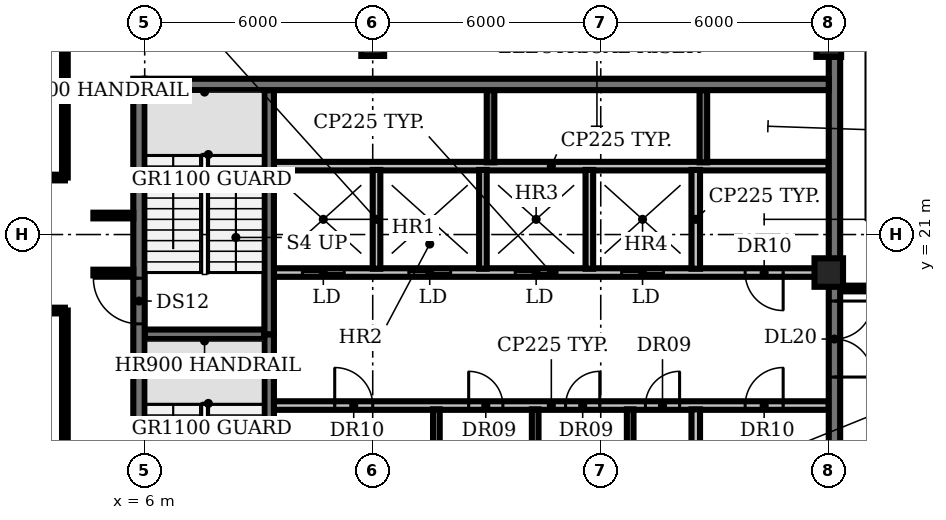
"""IFC4 building model, lengths in metres.
Left out: names, types, materials, properties, quantities, classifications, styles, units other than length and angle.
Written with IfcOpenShell. Run it as: python <this file> out.ifc"""

import sys

from ifc_helpers import new_model, si_unit, direction, frame, frame_2d, origin, origin_2d, place, context, subcontext, project, spatial, rectangle, circle, extrude, element, fill, save


model = new_model("IFC4")
c1 = context("Model", 3, precision=1e-05, world=origin(), true_north=direction((0.0, 1.0)))
c2 = subcontext(c1, "Body", "Model", "MODEL_VIEW")
j1 = project(units=[si_unit("LENGTHUNIT", "METRE"), si_unit("PLANEANGLEUNIT", "RADIAN")], contexts=[c1])
p1 = place(None, origin())
s1 = spatial("IfcSite", under=j1, at=p1, CompositionType="ELEMENT")
p2 = place(p1, origin())
s2 = spatial("IfcBuilding", under=s1, at=p2, CompositionType="ELEMENT")
p3 = place(p2, frame((0.0, 0.0, 314.6)))
s3 = spatial("IfcBuildingStorey", under=s2, at=p3, CompositionType="ELEMENT", Elevation=314.6)
p4 = place(p3, frame((12.0, 26.0, 0.0), z_axis=(0.0, 0.0, 1.0), x_axis=(1.0, 0.0, 0.0)))
e1 = element("IfcColumn", 1, at=p4, inside=s3, PredefinedType="COLUMN", context=c2, shape_type="SweptSolid", body=[
    extrude(rectangle(XDim=0.6, YDim=0.6, at=origin_2d()), origin(), (0.0, 0.0, 1.0), 3.9),
])
p5 = place(p3, frame((24.0, 20.0, 0.0), z_axis=(0.0, 0.0, 1.0), x_axis=(1.0, 0.0, 0.0)))
e2 = element("IfcColumn", 2, at=p5, inside=s3, PredefinedType="COLUMN", context=c2, shape_type="SweptSolid", body=[
    extrude(circle(Radius=0.375, at=origin_2d()), origin(), (0.0, 0.0, 1.0), 3.9),
])
p6 = place(p3, frame((24.0, 26.0, 0.0), z_axis=(0.0, 0.0, 1.0), x_axis=(1.0, 0.0, 0.0)))
e3 = element("IfcColumn", 3, at=p6, inside=s3, PredefinedType="COLUMN", context=c2, shape_type="SweptSolid", body=[
    extrude(rectangle(XDim=0.65, YDim=0.65, at=origin_2d()), origin(), (0.0, 0.0, 1.0), 3.9),
])
p7 = place(p3, frame((9.4, 16.5, 0.0), z_axis=(0.0, 0.0, 1.0), x_axis=(1.0, 0.0, 0.0)))
e4 = element("IfcWall", 4, at=p7, inside=s3, PredefinedType="PARTITIONING", context=c2, shape_type="SweptSolid", body=[
    extrude(rectangle(XDim=14.6, YDim=0.225, at=frame_2d((7.3, 0.0))), origin(), (0.0, 0.0, 1.0), 3.9),
])
p8 = place(p7, frame((1.6, 0.0, 0.0)))
e5 = element("IfcOpeningElement", 5, at=p8, cuts=e4, PredefinedType="OPENING", context=c2, shape_type="SweptSolid", body=[
    extrude(rectangle(XDim=1.0, YDim=2.1, at=frame_2d((0.5, 1.05))), frame((0.0, 0.123, 0.0), z_axis=(0.0, -1.0, 0.0), x_axis=(1.0, 0.0, 0.0)), (0.0, 0.0, 1.0), 0.245),
])
p9 = place(p7, frame((5.125, 0.0, 0.0)))
e6 = element("IfcOpeningElement", 6, at=p9, cuts=e4, PredefinedType="OPENING", context=c2, shape_type="SweptSolid", body=[
    extrude(rectangle(XDim=0.9, YDim=2.1, at=frame_2d((0.45, 1.05))), frame((0.0, 0.123, 0.0), z_axis=(0.0, -1.0, 0.0), x_axis=(1.0, 0.0, 0.0)), (0.0, 0.0, 1.0), 0.245),
])
p10 = place(p7, frame((7.675, 0.0, 0.0)))
e7 = element("IfcOpeningElement", 7, at=p10, cuts=e4, PredefinedType="OPENING", context=c2, shape_type="SweptSolid", body=[
    extrude(rectangle(XDim=0.9, YDim=2.1, at=frame_2d((0.45, 1.05))), frame((0.0, 0.123, 0.0), z_axis=(0.0, -1.0, 0.0), x_axis=(1.0, 0.0, 0.0)), (0.0, 0.0, 1.0), 0.245),
])
p11 = place(p7, frame((9.775, 0.0, 0.0)))
e8 = element("IfcOpeningElement", 8, at=p11, cuts=e4, PredefinedType="OPENING", context=c2, shape_type="SweptSolid", body=[
    extrude(rectangle(XDim=0.9, YDim=2.1, at=frame_2d((0.45, 1.05))), frame((0.0, 0.123, 0.0), z_axis=(0.0, -1.0, 0.0), x_axis=(1.0, 0.0, 0.0)), (0.0, 0.0, 1.0), 0.245),
])
p12 = place(p7, frame((12.4, 0.0, 0.0)))
e9 = element("IfcOpeningElement", 9, at=p12, cuts=e4, PredefinedType="OPENING", context=c2, shape_type="SweptSolid", body=[
    extrude(rectangle(XDim=1.0, YDim=2.1, at=frame_2d((0.5, 1.05))), frame((0.0, 0.123, 0.0), z_axis=(0.0, -1.0, 0.0), x_axis=(1.0, 0.0, 0.0)), (0.0, 0.0, 1.0), 0.245),
])
p13 = place(p3, frame((6.0, 18.375, 0.0), z_axis=(0.0, 0.0, 1.0), x_axis=(1.0, 0.0, 0.0)))
e10 = element("IfcWall", 10, at=p13, inside=s3, PredefinedType="SHEAR", context=c2, shape_type="SweptSolid", body=[
    extrude(rectangle(XDim=3.15, YDim=0.25, at=frame_2d((1.575, 0.0))), origin(), (0.0, 0.0, 1.0), 3.9),
])
p14 = place(p3, frame((24.0, 20.0, 0.0), z_axis=(0.0, 0.0, 1.0), x_axis=(-1.0, 0.0, 0.0)))
e11 = element("IfcWall", 11, at=p14, inside=s3, PredefinedType="PARTITIONING", context=c2, shape_type="SweptSolid", body=[
    extrude(rectangle(XDim=14.6, YDim=0.225, at=frame_2d((7.3, 0.0))), origin(), (0.0, 0.0, 1.0), 3.9),
])
p15 = place(p14, frame((12.75, 0.0, 0.0)))
e12 = element("IfcOpeningElement", 12, at=p15, cuts=e11, PredefinedType="OPENING", context=c2, shape_type="SweptSolid", body=[
    extrude(rectangle(XDim=1.1, YDim=2.1, at=frame_2d((0.55, 1.05))), frame((0.0, 0.123, 0.0), z_axis=(0.0, -1.0, 0.0), x_axis=(1.0, 0.0, 0.0)), (0.0, 0.0, 1.0), 0.245),
])
p16 = place(p14, frame((9.95, 0.0, 0.0)))
e13 = element("IfcOpeningElement", 13, at=p16, cuts=e11, PredefinedType="OPENING", context=c2, shape_type="SweptSolid", body=[
    extrude(rectangle(XDim=1.1, YDim=2.1, at=frame_2d((0.55, 1.05))), frame((0.0, 0.123, 0.0), z_axis=(0.0, -1.0, 0.0), x_axis=(1.0, 0.0, 0.0)), (0.0, 0.0, 1.0), 0.245),
])
p17 = place(p14, frame((7.15, 0.0, 0.0)))
e14 = element("IfcOpeningElement", 14, at=p17, cuts=e11, PredefinedType="OPENING", context=c2, shape_type="SweptSolid", body=[
    extrude(rectangle(XDim=1.1, YDim=2.1, at=frame_2d((0.55, 1.05))), frame((0.0, 0.123, 0.0), z_axis=(0.0, -1.0, 0.0), x_axis=(1.0, 0.0, 0.0)), (0.0, 0.0, 1.0), 0.245),
])
p18 = place(p14, frame((4.35, 0.0, 0.0)))
e15 = element("IfcOpeningElement", 15, at=p18, cuts=e11, PredefinedType="OPENING", context=c2, shape_type="SweptSolid", body=[
    extrude(rectangle(XDim=1.1, YDim=2.1, at=frame_2d((0.55, 1.05))), frame((0.0, 0.123, 0.0), z_axis=(0.0, -1.0, 0.0), x_axis=(1.0, 0.0, 0.0)), (0.0, 0.0, 1.0), 0.245),
])
p19 = place(p14, frame((1.2, 0.0, 0.0)))
e16 = element("IfcOpeningElement", 16, at=p19, cuts=e11, PredefinedType="OPENING", context=c2, shape_type="SweptSolid", body=[
    extrude(rectangle(XDim=1.0, YDim=2.1, at=frame_2d((0.5, 1.05))), frame((0.0, 0.123, 0.0), z_axis=(0.0, -1.0, 0.0), x_axis=(1.0, 0.0, 0.0)), (0.0, 0.0, 1.0), 0.245),
])
p20 = place(p3, frame((9.4, 22.8, 0.0), z_axis=(0.0, 0.0, 1.0), x_axis=(1.0, 0.0, 0.0)))
e17 = element("IfcWall", 17, at=p20, inside=s3, PredefinedType="PARTITIONING", context=c2, shape_type="SweptSolid", body=[
    extrude(rectangle(XDim=14.6, YDim=0.225, at=frame_2d((7.3, 0.0))), origin(), (0.0, 0.0, 1.0), 3.9),
])
p21 = place(p3, frame((9.275, 18.375, 0.0), z_axis=(0.0, 0.0, 1.0), x_axis=(0.0, -1.0, 0.0)))
e18 = element("IfcWall", 18, at=p21, inside=s3, PredefinedType="SHEAR", context=c2, shape_type="SweptSolid", body=[
    extrude(rectangle(XDim=6.55, YDim=0.25, at=frame_2d((3.275, 0.0))), origin(), (0.0, 0.0, 1.0), 3.9),
])
p22 = place(p21, frame((5.075, 0.0, 0.0)))
e19 = element("IfcOpeningElement", 19, at=p22, cuts=e18, PredefinedType="OPENING", context=c2, shape_type="SweptSolid", body=[
    extrude(rectangle(XDim=1.0, YDim=2.1, at=frame_2d((0.5, 1.05))), frame((0.0, 0.135, 0.0), z_axis=(0.0, -1.0, 0.0), x_axis=(1.0, 0.0, 0.0)), (0.0, 0.0, 1.0), 0.27),
])
p23 = place(p3, frame((9.275, 18.375, 0.0), z_axis=(0.0, 0.0, 1.0), x_axis=(0.0, 1.0, 0.0)))
e20 = element("IfcWall", 20, at=p23, inside=s3, PredefinedType="SHEAR", context=c2, shape_type="SweptSolid", body=[
    extrude(rectangle(XDim=6.425, YDim=0.25, at=frame_2d((3.212, 0.0))), origin(), (0.0, 0.0, 1.0), 3.9),
])
p24 = place(p3, frame((12.1, 20.1, 0.0), z_axis=(0.0, 0.0, 1.0), x_axis=(0.0, 1.0, 0.0)))
e21 = element("IfcWall", 21, at=p24, inside=s3, PredefinedType="SOLIDWALL", context=c2, shape_type="SweptSolid", body=[
    extrude(rectangle(XDim=2.6, YDim=0.2, at=frame_2d((1.3, 0.0))), origin(), (0.0, 0.0, 1.0), 3.9),
])
p25 = place(p3, frame((13.675, 13.8, 0.0), z_axis=(0.0, 0.0, 1.0), x_axis=(0.0, 1.0, 0.0)))
e22 = element("IfcWall", 22, at=p25, inside=s3, PredefinedType="PARTITIONING", context=c2, shape_type="SweptSolid", body=[
    extrude(rectangle(XDim=2.6, YDim=0.175, at=frame_2d((1.3, 0.0))), origin(), (0.0, 0.0, 1.0), 3.9),
])
p26 = place(p3, frame((14.9, 20.1, 0.0), z_axis=(0.0, 0.0, 1.0), x_axis=(0.0, 1.0, 0.0)))
e23 = element("IfcWall", 23, at=p26, inside=s3, PredefinedType="SOLIDWALL", context=c2, shape_type="SweptSolid", body=[
    extrude(rectangle(XDim=2.6, YDim=0.2, at=frame_2d((1.3, 0.0))), origin(), (0.0, 0.0, 1.0), 3.9),
])
p27 = place(p3, frame((15.1, 22.9, 0.0), z_axis=(0.0, 0.0, 1.0), x_axis=(0.0, 1.0, 0.0)))
e24 = element("IfcWall", 24, at=p27, inside=s3, PredefinedType="SHEAR", context=c2, shape_type="SweptSolid", body=[
    extrude(rectangle(XDim=1.9, YDim=0.2, at=frame_2d((0.95, 0.0))), origin(), (0.0, 0.0, 1.0), 3.9),
])
p28 = place(p3, frame((16.275, 13.8, 0.0), z_axis=(0.0, 0.0, 1.0), x_axis=(0.0, 1.0, 0.0)))
e25 = element("IfcWall", 25, at=p28, inside=s3, PredefinedType="PARTITIONING", context=c2, shape_type="SweptSolid", body=[
    extrude(rectangle(XDim=2.6, YDim=0.175, at=frame_2d((1.3, 0.0))), origin(), (0.0, 0.0, 1.0), 3.9),
])
p29 = place(p3, frame((17.7, 20.1, 0.0), z_axis=(0.0, 0.0, 1.0), x_axis=(0.0, 1.0, 0.0)))
e26 = element("IfcWall", 26, at=p29, inside=s3, PredefinedType="SOLIDWALL", context=c2, shape_type="SweptSolid", body=[
    extrude(rectangle(XDim=2.6, YDim=0.2, at=frame_2d((1.3, 0.0))), origin(), (0.0, 0.0, 1.0), 3.9),
])
p30 = place(p3, frame((18.775, 13.8, 0.0), z_axis=(0.0, 0.0, 1.0), x_axis=(0.0, 1.0, 0.0)))
e27 = element("IfcWall", 27, at=p30, inside=s3, PredefinedType="PARTITIONING", context=c2, shape_type="SweptSolid", body=[
    extrude(rectangle(XDim=2.6, YDim=0.175, at=frame_2d((1.3, 0.0))), origin(), (0.0, 0.0, 1.0), 3.9),
])
for number, where, z_axis, x_axis in (
    (28, (20.5, 13.8, 0.0), (0.0, 0.0, 1.0), (0.0, 1.0, 0.0)),
    (29, (20.5, 20.1, 0.0), (0.0, 0.0, 1.0), (0.0, 1.0, 0.0)),
):
    element("IfcWall", number, at=place(p3, frame(where, z_axis=z_axis, x_axis=x_axis)), inside=s3, PredefinedType="PARTITIONING", context=c2, shape_type="SweptSolid", body=[
        extrude(rectangle(XDim=2.6, YDim=0.225, at=frame_2d((1.3, 0.0))), origin(), (0.0, 0.0, 1.0), 3.9),
    ])
p31 = place(p3, frame((20.7, 22.9, 0.0), z_axis=(0.0, 0.0, 1.0), x_axis=(0.0, 1.0, 0.0)))
e30 = element("IfcWall", 30, at=p31, inside=s3, PredefinedType="SHEAR", context=c2, shape_type="SweptSolid", body=[
    extrude(rectangle(XDim=1.9, YDim=0.2, at=frame_2d((0.95, 0.0))), origin(), (0.0, 0.0, 1.0), 3.9),
])
p32 = place(p3, frame((5.85, 5.1, 0.0), z_axis=(0.0, 0.0, 1.0), x_axis=(0.0, 1.0, 0.0)))
e31 = element("IfcWall", 31, at=p32, inside=s3, PredefinedType="SHEAR", context=c2, shape_type="SweptSolid", body=[
    extrude(rectangle(XDim=20.0, YDim=0.3, at=frame_2d((10.0, 0.0))), origin(), (0.0, 0.0, 1.0), 3.9),
])
p33 = place(p32, frame((0.55, 0.0, 0.0)))
e32 = element("IfcOpeningElement", 32, at=p33, cuts=e31, PredefinedType="OPENING", context=c2, shape_type="SweptSolid", body=[
    extrude(rectangle(XDim=1.5, YDim=2.1, at=frame_2d((0.75, 1.05))), frame((0.0, 0.16, 0.0), z_axis=(0.0, -1.0, 0.0), x_axis=(1.0, 0.0, 0.0)), (0.0, 0.0, 1.0), 0.32),
])
p34 = place(p32, frame((7.0, 0.0, 0.0)))
e33 = element("IfcOpeningElement", 33, at=p34, cuts=e31, PredefinedType="OPENING", context=c2, shape_type="SweptSolid", body=[
    extrude(rectangle(XDim=1.2, YDim=2.1, at=frame_2d((0.6, 1.05))), frame((0.0, 0.16, 0.0), z_axis=(0.0, -1.0, 0.0), x_axis=(1.0, 0.0, 0.0)), (0.0, 0.0, 1.0), 0.32),
])
p35 = place(p32, frame((13.55, 0.0, 0.0)))
e34 = element("IfcOpeningElement", 34, at=p35, cuts=e31, PredefinedType="OPENING", context=c2, shape_type="SweptSolid", body=[
    extrude(rectangle(XDim=1.2, YDim=2.1, at=frame_2d((0.6, 1.05))), frame((0.0, 0.16, 0.0), z_axis=(0.0, -1.0, 0.0), x_axis=(1.0, 0.0, 0.0)), (0.0, 0.0, 1.0), 0.32),
])
p36 = place(p3, frame((24.15, 25.705, 0.0), z_axis=(0.0, 0.0, 1.0), x_axis=(0.0, -1.0, 0.0)))
e35 = element("IfcWall", 35, at=p36, inside=s3, PredefinedType="SHEAR", context=c2, shape_type="SweptSolid", body=[
    extrude(rectangle(XDim=20.605, YDim=0.3, at=frame_2d((10.302, 0.0))), origin(), (0.0, 0.0, 1.0), 3.9),
])
p37 = place(p36, frame((18.555, 0.0, 0.0)))
e36 = element("IfcOpeningElement", 36, at=p37, cuts=e35, PredefinedType="OPENING", context=c2, shape_type="SweptSolid", body=[
    extrude(rectangle(XDim=1.5, YDim=2.1, at=frame_2d((0.75, 1.05))), frame((0.0, 0.16, 0.0), z_axis=(0.0, -1.0, 0.0), x_axis=(1.0, 0.0, 0.0)), (0.0, 0.0, 1.0), 0.32),
])
p38 = place(p36, frame((12.455, 0.0, 0.0)))
e37 = element("IfcOpeningElement", 37, at=p38, cuts=e35, PredefinedType="OPENING", context=c2, shape_type="SweptSolid", body=[
    extrude(rectangle(XDim=0.9, YDim=2.1, at=frame_2d((0.45, 1.05))), frame((0.0, 0.16, 0.0), z_axis=(0.0, -1.0, 0.0), x_axis=(1.0, 0.0, 0.0)), (0.0, 0.0, 1.0), 0.32),
])
p39 = place(p36, frame((6.455, 0.0, 0.0)))
e38 = element("IfcOpeningElement", 38, at=p39, cuts=e35, PredefinedType="OPENING", context=c2, shape_type="SweptSolid", body=[
    extrude(rectangle(XDim=2.0, YDim=2.1, at=frame_2d((1.0, 1.05))), frame((0.0, 0.16, 0.0), z_axis=(0.0, -1.0, 0.0), x_axis=(1.0, 0.0, 0.0)), (0.0, 0.0, 1.0), 0.32),
])
p40 = place(p3, frame((6.0, 24.95, 0.0), z_axis=(0.0, 0.0, 1.0), x_axis=(1.0, 0.0, 0.0)))
e39 = element("IfcWall", 39, at=p40, inside=s3, PredefinedType="SHEAR", context=c2, shape_type="SweptSolid", body=[
    extrude(rectangle(XDim=18.0, YDim=0.3, at=frame_2d((9.0, 0.0))), origin(), (0.0, 0.0, 1.0), 3.9),
])
for number, where, z_axis, x_axis in (
    (40, (2.79, 19.0, 0.0), (0.0, 0.0, 1.0), (1.0, 0.0, 0.0)),
    (41, (2.79, 22.5, 0.0), (0.0, 0.0, 1.0), (1.0, 0.0, 0.0)),
):
    element("IfcWall", number, at=place(p3, frame(where, z_axis=z_axis, x_axis=x_axis)), inside=s3, PredefinedType="PARTITIONING", context=c2, shape_type="SweptSolid", body=[
        extrude(rectangle(XDim=1.11, YDim=0.15, at=frame_2d((0.555, 0.0))), origin(), (0.0, 0.0, 1.0), 2.95),
    ])
p41 = place(p3, frame((3.9, 5.1, 0.0), z_axis=(0.0, 0.0, 1.0), x_axis=(0.0, 1.0, 0.0)))
e42 = element("IfcWall", 42, at=p41, inside=s3, PredefinedType="PARTITIONING", context=c2, shape_type="SweptSolid", body=[
    extrude(rectangle(XDim=13.9, YDim=0.15, at=frame_2d((6.95, 0.0))), origin(), (0.0, 0.0, 1.0), 2.95),
])
p42 = place(p41, frame((6.2, 0.0, 0.0)))
e43 = element("IfcOpeningElement", 43, at=p42, cuts=e42, PredefinedType="OPENING", context=c2, shape_type="SweptSolid", body=[
    extrude(rectangle(XDim=1.2, YDim=2.1, at=frame_2d((0.6, 1.05))), frame((0.0, 0.085, 0.0), z_axis=(0.0, -1.0, 0.0), x_axis=(1.0, 0.0, 0.0)), (0.0, 0.0, 1.0), 0.17),
])
p43 = place(p3, frame((3.9, 22.5, 0.0), z_axis=(0.0, 0.0, 1.0), x_axis=(0.0, 1.0, 0.0)))
e44 = element("IfcWall", 44, at=p43, inside=s3, PredefinedType="PARTITIONING", context=c2, shape_type="SweptSolid", body=[
    extrude(rectangle(XDim=5.6, YDim=0.15, at=frame_2d((2.8, 0.0))), origin(), (0.0, 0.0, 1.0), 2.95),
])
for number, where, z_axis, x_axis in (
    (45, (4.65, 20.0, 0.0), (0.0, 0.0, 1.0), (1.0, 0.0, 0.0)),
    (46, (4.65, 21.5, 0.0), (0.0, 0.0, 1.0), (1.0, 0.0, 0.0)),
):
    element("IfcWall", number, at=place(p3, frame(where, z_axis=z_axis, x_axis=x_axis)), inside=s3, PredefinedType="PARTITIONING", context=c2, shape_type="SweptSolid", body=[
        extrude(rectangle(XDim=1.05, YDim=0.15, at=frame_2d((0.525, 0.0))), origin(), (0.0, 0.0, 1.0), 2.95),
    ])
p44 = place(p3, frame((24.4, 19.58, 0.0), z_axis=(0.0, 0.0, 1.0), x_axis=(1.0, 0.0, 0.0)))
e47 = element("IfcWall", 47, at=p44, inside=s3, PredefinedType="PARTITIONING", context=c2, shape_type="SweptSolid", body=[
    extrude(rectangle(XDim=1.7, YDim=0.15, at=frame_2d((0.85, 0.0))), origin(), (0.0, 0.0, 1.0), 2.95),
])
p45 = place(p8, origin())
e48 = element("IfcDoor", 48, at=p45, inside=s3, OperationType="SINGLE_SWING_LEFT", PredefinedType="DOOR", context=c2, shape_type="SweptSolid", body=[
    extrude(rectangle(XDim=1.0, YDim=2.1, at=frame_2d((0.5, 1.05))), frame((0.0, 0.025, 0.0), z_axis=(0.0, -1.0, 0.0), x_axis=(1.0, 0.0, 0.0)), (0.0, 0.0, 1.0), 0.05),
])
fill(e5, e48)
p46 = place(p9, origin())
e49 = element("IfcDoor", 49, at=p46, inside=s3, OperationType="SINGLE_SWING_LEFT", PredefinedType="DOOR", context=c2, shape_type="SweptSolid", body=[
    extrude(rectangle(XDim=0.9, YDim=2.1, at=frame_2d((0.45, 1.05))), frame((0.0, 0.025, 0.0), z_axis=(0.0, -1.0, 0.0), x_axis=(1.0, 0.0, 0.0)), (0.0, 0.0, 1.0), 0.05),
])
fill(e6, e49)
p47 = place(p10, origin())
e50 = element("IfcDoor", 50, at=p47, inside=s3, OperationType="SINGLE_SWING_RIGHT", PredefinedType="DOOR", context=c2, shape_type="SweptSolid", body=[
    extrude(rectangle(XDim=0.9, YDim=2.1, at=frame_2d((0.45, 1.05))), frame((0.0, 0.025, 0.0), z_axis=(0.0, -1.0, 0.0), x_axis=(1.0, 0.0, 0.0)), (0.0, 0.0, 1.0), 0.05),
])
fill(e7, e50)
p48 = place(p11, origin())
e51 = element("IfcDoor", 51, at=p48, inside=s3, OperationType="SINGLE_SWING_RIGHT", PredefinedType="DOOR", context=c2, shape_type="SweptSolid", body=[
    extrude(rectangle(XDim=0.9, YDim=2.1, at=frame_2d((0.45, 1.05))), frame((0.0, 0.025, 0.0), z_axis=(0.0, -1.0, 0.0), x_axis=(1.0, 0.0, 0.0)), (0.0, 0.0, 1.0), 0.05),
])
fill(e8, e51)
p49 = place(p12, origin())
e52 = element("IfcDoor", 52, at=p49, inside=s3, OperationType="SINGLE_SWING_RIGHT", PredefinedType="DOOR", context=c2, shape_type="SweptSolid", body=[
    extrude(rectangle(XDim=1.0, YDim=2.1, at=frame_2d((0.5, 1.05))), frame((0.0, 0.025, 0.0), z_axis=(0.0, -1.0, 0.0), x_axis=(1.0, 0.0, 0.0)), (0.0, 0.0, 1.0), 0.05),
])
fill(e9, e52)
p50 = place(p15, origin())
e53 = element("IfcDoor", 53, at=p50, inside=s3, OperationType="DOUBLE_DOOR_SLIDING", PredefinedType="DOOR", context=c2, shape_type="SweptSolid", body=[
    extrude(rectangle(XDim=1.1, YDim=2.1, at=frame_2d((0.55, 1.05))), frame((0.0, 0.025, 0.0), z_axis=(0.0, -1.0, 0.0), x_axis=(1.0, 0.0, 0.0)), (0.0, 0.0, 1.0), 0.05),
])
fill(e12, e53)
p51 = place(p16, origin())
e54 = element("IfcDoor", 54, at=p51, inside=s3, OperationType="DOUBLE_DOOR_SLIDING", PredefinedType="DOOR", context=c2, shape_type="SweptSolid", body=[
    extrude(rectangle(XDim=1.1, YDim=2.1, at=frame_2d((0.55, 1.05))), frame((0.0, 0.025, 0.0), z_axis=(0.0, -1.0, 0.0), x_axis=(1.0, 0.0, 0.0)), (0.0, 0.0, 1.0), 0.05),
])
fill(e13, e54)
p52 = place(p17, origin())
e55 = element("IfcDoor", 55, at=p52, inside=s3, OperationType="DOUBLE_DOOR_SLIDING", PredefinedType="DOOR", context=c2, shape_type="SweptSolid", body=[
    extrude(rectangle(XDim=1.1, YDim=2.1, at=frame_2d((0.55, 1.05))), frame((0.0, 0.025, 0.0), z_axis=(0.0, -1.0, 0.0), x_axis=(1.0, 0.0, 0.0)), (0.0, 0.0, 1.0), 0.05),
])
fill(e14, e55)
p53 = place(p18, origin())
e56 = element("IfcDoor", 56, at=p53, inside=s3, OperationType="DOUBLE_DOOR_SLIDING", PredefinedType="DOOR", context=c2, shape_type="SweptSolid", body=[
    extrude(rectangle(XDim=1.1, YDim=2.1, at=frame_2d((0.55, 1.05))), frame((0.0, 0.025, 0.0), z_axis=(0.0, -1.0, 0.0), x_axis=(1.0, 0.0, 0.0)), (0.0, 0.0, 1.0), 0.05),
])
fill(e15, e56)
p54 = place(p19, origin())
e57 = element("IfcDoor", 57, at=p54, inside=s3, OperationType="SINGLE_SWING_LEFT", PredefinedType="DOOR", context=c2, shape_type="SweptSolid", body=[
    extrude(rectangle(XDim=1.0, YDim=2.1, at=frame_2d((0.5, 1.05))), frame((0.0, 0.025, 0.0), z_axis=(0.0, -1.0, 0.0), x_axis=(1.0, 0.0, 0.0)), (0.0, 0.0, 1.0), 0.05),
])
fill(e16, e57)
p55 = place(p35, origin())
e58 = element("IfcDoor", 58, at=p55, inside=s3, OperationType="SINGLE_SWING_RIGHT", PredefinedType="DOOR", context=c2, shape_type="SweptSolid", body=[
    extrude(rectangle(XDim=1.2, YDim=2.1, at=frame_2d((0.6, 1.05))), frame((0.0, 0.025, 0.0), z_axis=(0.0, -1.0, 0.0), x_axis=(1.0, 0.0, 0.0)), (0.0, 0.0, 1.0), 0.05),
])
fill(e34, e58)
p56 = place(p39, origin())
e59 = element("IfcDoor", 59, at=p56, inside=s3, OperationType="DOUBLE_DOOR_SINGLE_SWING", PredefinedType="DOOR", context=c2, shape_type="SweptSolid", body=[
    extrude(rectangle(XDim=2.0, YDim=2.1, at=frame_2d((1.0, 1.05))), frame((0.0, 0.025, 0.0), z_axis=(0.0, -1.0, 0.0), x_axis=(1.0, 0.0, 0.0)), (0.0, 0.0, 1.0), 0.05),
])
fill(e38, e59)
save(model, sys.argv[1])
